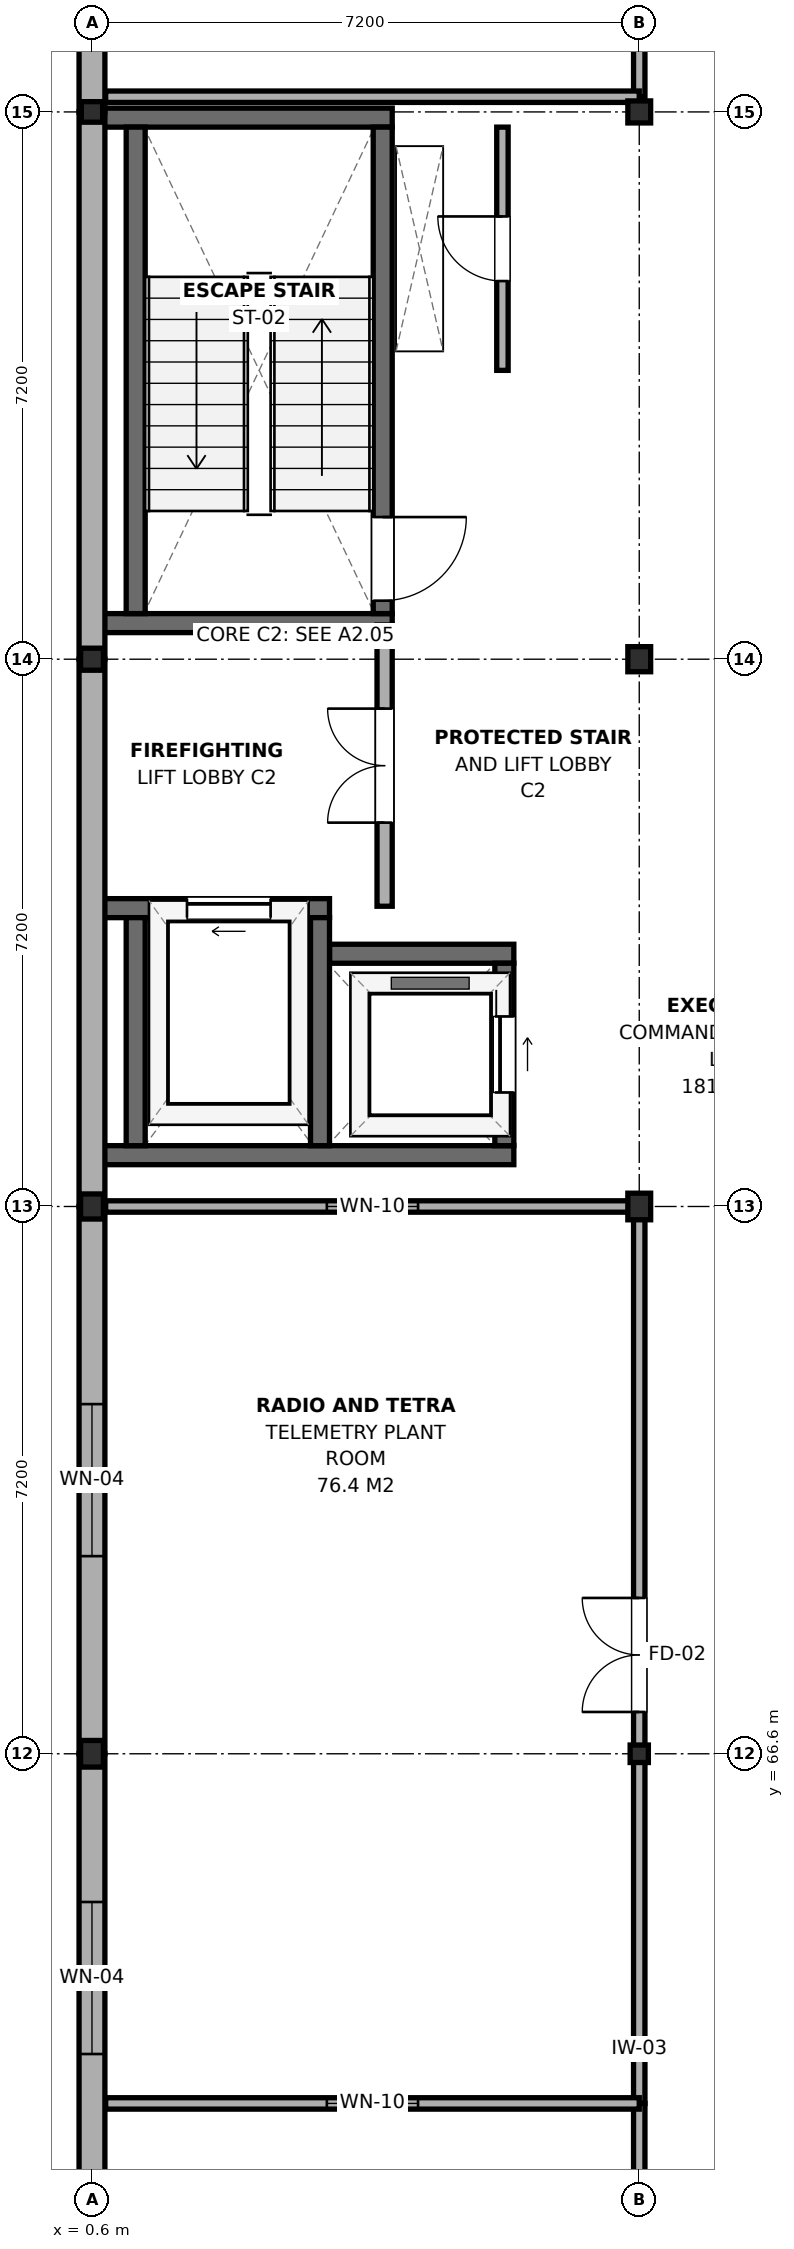
"""IFC4 building model, lengths in metres.
Left out: names, types, materials, properties, quantities, classifications, styles, units other than length and angle.
Written with IfcOpenShell. Run it as: python <this file> out.ifc"""

import sys

from ifc_helpers import new_model, si_unit, direction, frame, frame_2d, origin, origin_2d, place, context, subcontext, project, spatial, rectangle, i_section, extrude, element, fill, save


model = new_model("IFC4")
c1 = context("Model", 3, precision=1e-05, world=origin(), true_north=direction((0.0, 1.0)))
c2 = subcontext(c1, "Body", "Model", "MODEL_VIEW")
j1 = project(units=[si_unit("LENGTHUNIT", "METRE"), si_unit("PLANEANGLEUNIT", "RADIAN")], contexts=[c1])
p1 = place(None, origin())
s1 = spatial("IfcSite", under=j1, at=p1, CompositionType="ELEMENT")
p2 = place(p1, origin())
s2 = spatial("IfcBuilding", under=s1, at=p2, CompositionType="ELEMENT")
p3 = place(p2, frame((0.0, 0.0, 32.7)))
s3 = spatial("IfcBuildingStorey", under=s2, at=p3, CompositionType="ELEMENT", Elevation=32.7)
p4 = place(p3, frame((0.6, 66.6, 0.0), z_axis=(0.0, 0.0, 1.0), x_axis=(1.0, 0.0, 0.0)))
e1 = element("IfcColumn", 1, at=p4, inside=s3, PredefinedType="COLUMN", context=c2, shape_type="SweptSolid", body=[
    extrude(i_section(OverallWidth=0.3, OverallDepth=0.35, WebThickness=0.01, FlangeThickness=0.018, FilletRadius=0.027, at=origin_2d()), origin(), (0.0, 0.0, 1.0), 3.72),
])
p5 = place(p3, frame((0.6, 73.8, 0.0), z_axis=(0.0, 0.0, 1.0), x_axis=(1.0, 0.0, 0.0)))
e2 = element("IfcColumn", 2, at=p5, inside=s3, PredefinedType="COLUMN", context=c2, shape_type="SweptSolid", body=[
    extrude(i_section(OverallWidth=0.3, OverallDepth=0.33, WebThickness=0.01, FlangeThickness=0.017, FilletRadius=0.027, at=origin_2d()), origin(), (0.0, 0.0, 1.0), 3.72),
])
p6 = place(p3, frame((0.6, 81.0, 0.0), z_axis=(0.0, 0.0, 1.0), x_axis=(1.0, 0.0, 0.0)))
e3 = element("IfcColumn", 3, at=p6, inside=s3, PredefinedType="COLUMN", context=c2, shape_type="SweptSolid", body=[
    extrude(i_section(OverallWidth=0.3, OverallDepth=0.29, WebThickness=0.009, FlangeThickness=0.014, FilletRadius=0.027, at=origin_2d()), origin(), (0.0, 0.0, 1.0), 3.72),
])
p7 = place(p3, frame((0.6, 88.2, 0.0), z_axis=(0.0, 0.0, 1.0), x_axis=(1.0, 0.0, 0.0)))
e4 = element("IfcColumn", 4, at=p7, inside=s3, PredefinedType="COLUMN", context=c2, shape_type="SweptSolid", body=[
    extrude(i_section(OverallWidth=0.28, OverallDepth=0.27, WebThickness=0.008, FlangeThickness=0.013, FilletRadius=0.024, at=origin_2d()), origin(), (0.0, 0.0, 1.0), 3.72),
])
p8 = place(p3, frame((7.8, 66.6, 0.0), z_axis=(0.0, 0.0, 1.0), x_axis=(1.0, 0.0, 0.0)))
e5 = element("IfcColumn", 5, at=p8, inside=s3, PredefinedType="COLUMN", context=c2, shape_type="SweptSolid", body=[
    extrude(i_section(OverallWidth=0.24, OverallDepth=0.23, WebThickness=0.008, FlangeThickness=0.012, FilletRadius=0.021, at=origin_2d()), origin(), (0.0, 0.0, 1.0), 3.72),
])
p9 = place(p3, frame((7.8, 73.8, 0.0), z_axis=(0.0, 0.0, 1.0), x_axis=(1.0, 0.0, 0.0)))
e6 = element("IfcColumn", 6, at=p9, inside=s3, PredefinedType="COLUMN", context=c2, shape_type="SweptSolid", body=[
    extrude(i_section(OverallWidth=0.3, OverallDepth=0.35, WebThickness=0.01, FlangeThickness=0.018, FilletRadius=0.027, at=origin_2d()), origin(), (0.0, 0.0, 1.0), 3.72),
])
p10 = place(p3, frame((7.8, 81.0, 0.0), z_axis=(0.0, 0.0, 1.0), x_axis=(1.0, 0.0, 0.0)))
e7 = element("IfcColumn", 7, at=p10, inside=s3, PredefinedType="COLUMN", context=c2, shape_type="SweptSolid", body=[
    extrude(i_section(OverallWidth=0.3, OverallDepth=0.33, WebThickness=0.01, FlangeThickness=0.017, FilletRadius=0.027, at=origin_2d()), origin(), (0.0, 0.0, 1.0), 3.72),
])
p11 = place(p3, frame((7.8, 88.2, 0.0), z_axis=(0.0, 0.0, 1.0), x_axis=(1.0, 0.0, 0.0)))
e8 = element("IfcColumn", 8, at=p11, inside=s3, PredefinedType="COLUMN", context=c2, shape_type="SweptSolid", body=[
    extrude(i_section(OverallWidth=0.3, OverallDepth=0.29, WebThickness=0.009, FlangeThickness=0.014, FilletRadius=0.027, at=origin_2d()), origin(), (0.0, 0.0, 1.0), 3.72),
])
for number, where, z_axis, x_axis in (
    (9, (0.75, 81.475, 0.0), (0.0, 0.0, 1.0), (1.0, 0.0, 0.0)),
    (10, (0.75, 88.125, 0.0), (0.0, 0.0, 1.0), (1.0, 0.0, 0.0)),
):
    element("IfcWall", number, at=place(p3, frame(where, z_axis=z_axis, x_axis=x_axis)), inside=s3, PredefinedType="SHEAR", context=c2, shape_type="SweptSolid", body=[
        extrude(rectangle(XDim=3.8, YDim=0.25, at=frame_2d((1.9, 0.0))), origin(), (0.0, 0.0, 1.0), 3.9),
    ])
p12 = place(p3, frame((1.175, 81.6, 0.0), z_axis=(0.0, 0.0, 1.0), x_axis=(0.0, 1.0, 0.0)))
e11 = element("IfcWall", 11, at=p12, inside=s3, PredefinedType="SHEAR", context=c2, shape_type="SweptSolid", body=[
    extrude(rectangle(XDim=6.4, YDim=0.25, at=frame_2d((3.2, 0.0))), origin(), (0.0, 0.0, 1.0), 3.9),
])
p13 = place(p3, frame((4.425, 81.6, 0.0), z_axis=(0.0, 0.0, 1.0), x_axis=(0.0, 1.0, 0.0)))
e12 = element("IfcWall", 12, at=p13, inside=s3, PredefinedType="SHEAR", context=c2, shape_type="SweptSolid", body=[
    extrude(rectangle(XDim=6.4, YDim=0.25, at=frame_2d((3.2, 0.0))), origin(), (0.0, 0.0, 1.0), 3.9),
])
p14 = place(p13, frame((0.17, 0.0, 0.0)))
e13 = element("IfcOpeningElement", 13, at=p14, cuts=e12, PredefinedType="OPENING", context=c2, shape_type="SweptSolid", body=[
    extrude(rectangle(XDim=1.1, YDim=2.15, at=frame_2d((0.55, 1.075))), frame((0.0, 0.14, 0.0), z_axis=(0.0, -1.0, 0.0), x_axis=(1.0, 0.0, 0.0)), (0.0, 0.0, 1.0), 0.28),
])
p15 = place(p3, frame((0.75, 74.475, 0.0), z_axis=(0.0, 0.0, 1.0), x_axis=(1.0, 0.0, 0.0)))
e14 = element("IfcWall", 14, at=p15, inside=s3, PredefinedType="SHEAR", context=c2, shape_type="SweptSolid", body=[
    extrude(rectangle(XDim=5.4, YDim=0.25, at=frame_2d((2.7, 0.0))), origin(), (0.0, 0.0, 1.0), 3.9),
])
p16 = place(p3, frame((0.75, 77.725, 0.0), z_axis=(0.0, 0.0, 1.0), x_axis=(1.0, 0.0, 0.0)))
e15 = element("IfcWall", 15, at=p16, inside=s3, PredefinedType="SHEAR", context=c2, shape_type="SweptSolid", body=[
    extrude(rectangle(XDim=2.975, YDim=0.25, at=frame_2d((1.488, 0.0))), origin(), (0.0, 0.0, 1.0), 3.9),
])
p17 = place(p16, frame((1.1, 0.0, 0.0)))
e16 = element("IfcOpeningElement", 16, at=p17, cuts=e15, PredefinedType="OPENING", context=c2, shape_type="SweptSolid", body=[
    extrude(rectangle(XDim=1.1, YDim=2.15, at=frame_2d((0.55, 1.075))), frame((0.0, 0.14, 0.0), z_axis=(0.0, -1.0, 0.0), x_axis=(1.0, 0.0, 0.0)), (0.0, 0.0, 1.0), 0.28),
])
p18 = place(p3, frame((3.725, 77.125, 0.0), z_axis=(0.0, 0.0, 1.0), x_axis=(1.0, 0.0, 0.0)))
e17 = element("IfcWall", 17, at=p18, inside=s3, PredefinedType="SHEAR", context=c2, shape_type="SweptSolid", body=[
    extrude(rectangle(XDim=2.425, YDim=0.25, at=frame_2d((1.212, 0.0))), origin(), (0.0, 0.0, 1.0), 3.9),
])
for number, where, z_axis, x_axis in (
    (18, (1.175, 74.6, 0.0), (0.0, 0.0, 1.0), (0.0, 1.0, 0.0)),
    (19, (3.6, 74.6, 0.0), (0.0, 0.0, 1.0), (0.0, 1.0, 0.0)),
):
    element("IfcWall", number, at=place(p3, frame(where, z_axis=z_axis, x_axis=x_axis)), inside=s3, PredefinedType="SHEAR", context=c2, shape_type="SweptSolid", body=[
        extrude(rectangle(XDim=3.0, YDim=0.25, at=frame_2d((1.5, 0.0))), origin(), (0.0, 0.0, 1.0), 3.9),
    ])
p19 = place(p3, frame((6.025, 74.6, 0.0), z_axis=(0.0, 0.0, 1.0), x_axis=(0.0, 1.0, 0.0)))
e20 = element("IfcWall", 20, at=p19, inside=s3, PredefinedType="SHEAR", context=c2, shape_type="SweptSolid", body=[
    extrude(rectangle(XDim=2.4, YDim=0.25, at=frame_2d((1.2, 0.0))), origin(), (0.0, 0.0, 1.0), 3.9),
])
p20 = place(p19, frame((0.7, 0.0, 0.0)))
e21 = element("IfcOpeningElement", 21, at=p20, cuts=e20, PredefinedType="OPENING", context=c2, shape_type="SweptSolid", body=[
    extrude(rectangle(XDim=1.0, YDim=2.15, at=frame_2d((0.5, 1.075))), frame((0.0, 0.14, 0.0), z_axis=(0.0, -1.0, 0.0), x_axis=(1.0, 0.0, 0.0)), (0.0, 0.0, 1.0), 0.28),
])
p21 = place(p3, frame((0.6, 58.8, 0.0), z_axis=(0.0, 0.0, 1.0), x_axis=(0.0, 1.0, 0.0)))
e22 = element("IfcWall", 22, at=p21, inside=s3, PredefinedType="SOLIDWALL", context=c2, shape_type="SweptSolid", body=[
    extrude(rectangle(XDim=7.8, YDim=0.34, at=frame_2d((3.9, 0.0))), origin(), (0.0, 0.0, 1.0), 3.115),
])
p22 = place(p21, frame((3.85, 0.0, 0.9)))
e23 = element("IfcOpeningElement", 23, at=p22, cuts=e22, PredefinedType="OPENING", context=c2, shape_type="SweptSolid", body=[
    extrude(rectangle(XDim=2.0, YDim=1.8, at=frame_2d((1.0, 0.9))), frame((0.0, 0.185, 0.0), z_axis=(0.0, -1.0, 0.0), x_axis=(1.0, 0.0, 0.0)), (0.0, 0.0, 1.0), 0.37),
])
p23 = place(p3, frame((0.6, 66.6, 0.0), z_axis=(0.0, 0.0, 1.0), x_axis=(0.0, 1.0, 0.0)))
e24 = element("IfcWall", 24, at=p23, inside=s3, PredefinedType="SOLIDWALL", context=c2, shape_type="SweptSolid", body=[
    extrude(rectangle(XDim=7.2, YDim=0.34, at=frame_2d((3.6, 0.0))), origin(), (0.0, 0.0, 1.0), 3.115),
])
p24 = place(p23, frame((2.6, 0.0, 0.9)))
e25 = element("IfcOpeningElement", 25, at=p24, cuts=e24, PredefinedType="OPENING", context=c2, shape_type="SweptSolid", body=[
    extrude(rectangle(XDim=2.0, YDim=1.8, at=frame_2d((1.0, 0.9))), frame((0.0, 0.185, 0.0), z_axis=(0.0, -1.0, 0.0), x_axis=(1.0, 0.0, 0.0)), (0.0, 0.0, 1.0), 0.37),
])
p25 = place(p3, frame((0.6, 73.8, 0.0), z_axis=(0.0, 0.0, 1.0), x_axis=(0.0, 1.0, 0.0)))
e26 = element("IfcWall", 26, at=p25, inside=s3, PredefinedType="SOLIDWALL", context=c2, shape_type="SweptSolid", body=[
    extrude(rectangle(XDim=7.2, YDim=0.34, at=frame_2d((3.6, 0.0))), origin(), (0.0, 0.0, 1.0), 3.115),
])
p26 = place(p3, frame((0.6, 81.0, 0.0), z_axis=(0.0, 0.0, 1.0), x_axis=(0.0, 1.0, 0.0)))
e27 = element("IfcWall", 27, at=p26, inside=s3, PredefinedType="SOLIDWALL", context=c2, shape_type="SweptSolid", body=[
    extrude(rectangle(XDim=7.2, YDim=0.34, at=frame_2d((3.6, 0.0))), origin(), (0.0, 0.0, 1.0), 3.165),
])
p27 = place(p3, frame((0.6, 88.2, 0.0), z_axis=(0.0, 0.0, 1.0), x_axis=(0.0, 1.0, 0.0)))
e28 = element("IfcWall", 28, at=p27, inside=s3, PredefinedType="SOLIDWALL", context=c2, shape_type="SweptSolid", body=[
    extrude(rectangle(XDim=7.8, YDim=0.34, at=frame_2d((3.9, 0.0))), origin(), (0.0, 0.0, 1.0), 3.125),
])
p28 = place(p27, frame((1.95, 0.0, 0.9)))
e29 = element("IfcOpeningElement", 29, at=p28, cuts=e28, PredefinedType="OPENING", context=c2, shape_type="SweptSolid", body=[
    extrude(rectangle(XDim=2.0, YDim=1.8, at=frame_2d((1.0, 0.9))), frame((0.0, 0.185, 0.0), z_axis=(0.0, -1.0, 0.0), x_axis=(1.0, 0.0, 0.0)), (0.0, 0.0, 1.0), 0.37),
])
p29 = place(p3, frame((4.45, 77.75, 0.0), z_axis=(0.0, 0.0, 1.0), x_axis=(0.0, 1.0, 0.0)))
e30 = element("IfcWall", 30, at=p29, inside=s3, PredefinedType="PARTITIONING", context=c2, shape_type="SweptSolid", body=[
    extrude(rectangle(XDim=3.7, YDim=0.2, at=frame_2d((1.85, 0.0))), origin(), (0.0, 0.0, 1.0), 3.215),
])
p30 = place(p29, frame((1.1, 0.0, 0.0)))
e31 = element("IfcOpeningElement", 31, at=p30, cuts=e30, PredefinedType="OPENING", context=c2, shape_type="SweptSolid", body=[
    extrude(rectangle(XDim=1.5, YDim=2.15, at=frame_2d((0.75, 1.075))), frame((0.0, 0.115, 0.0), z_axis=(0.0, -1.0, 0.0), x_axis=(1.0, 0.0, 0.0)), (0.0, 0.0, 1.0), 0.23),
])
p31 = place(p3, frame((6.0, 84.8, 0.0), z_axis=(0.0, 0.0, 1.0), x_axis=(0.0, 1.0, 0.0)))
e32 = element("IfcWall", 32, at=p31, inside=s3, PredefinedType="PARTITIONING", context=c2, shape_type="SweptSolid", body=[
    extrude(rectangle(XDim=3.2, YDim=0.15, at=frame_2d((1.6, 0.0))), origin(), (0.0, 0.0, 1.0), 3.365),
])
p32 = place(p31, frame((1.175, 0.0, 0.0)))
e33 = element("IfcOpeningElement", 33, at=p32, cuts=e32, PredefinedType="OPENING", context=c2, shape_type="SweptSolid", body=[
    extrude(rectangle(XDim=0.85, YDim=2.1, at=frame_2d((0.425, 1.05))), frame((0.0, 0.09, 0.0), z_axis=(0.0, -1.0, 0.0), x_axis=(1.0, 0.0, 0.0)), (0.0, 0.0, 1.0), 0.18),
])
p33 = place(p3, frame((7.8, 40.0, 0.0), z_axis=(0.0, 0.0, 1.0), x_axis=(0.0, 1.0, 0.0)))
e34 = element("IfcWall", 34, at=p33, inside=s3, PredefinedType="PARTITIONING", context=c2, shape_type="SweptSolid", body=[
    extrude(rectangle(XDim=22.0, YDim=0.15, at=frame_2d((11.0, 0.0))), origin(), (0.0, 0.0, 1.0), 3.115),
])
p34 = place(p33, frame((10.2, 0.0, 0.0)))
e35 = element("IfcOpeningElement", 35, at=p34, cuts=e34, PredefinedType="OPENING", context=c2, shape_type="SweptSolid", body=[
    extrude(rectangle(XDim=1.6, YDim=2.15, at=frame_2d((0.8, 1.075))), frame((0.0, 0.09, 0.0), z_axis=(0.0, -1.0, 0.0), x_axis=(1.0, 0.0, 0.0)), (0.0, 0.0, 1.0), 0.18),
])
p35 = place(p33, frame((4.2, 0.0, 0.95)))
e36 = element("IfcOpeningElement", 36, at=p35, cuts=e34, PredefinedType="OPENING", context=c2, shape_type="SweptSolid", body=[
    extrude(rectangle(XDim=2.6, YDim=1.5, at=frame_2d((1.3, 0.75))), frame((0.0, 0.09, 0.0), z_axis=(0.0, -1.0, 0.0), x_axis=(1.0, 0.0, 0.0)), (0.0, 0.0, 1.0), 0.18),
])
p36 = place(p33, frame((15.2, 0.0, 0.95)))
e37 = element("IfcOpeningElement", 37, at=p36, cuts=e34, PredefinedType="OPENING", context=c2, shape_type="SweptSolid", body=[
    extrude(rectangle(XDim=2.6, YDim=1.5, at=frame_2d((1.3, 0.75))), frame((0.0, 0.09, 0.0), z_axis=(0.0, -1.0, 0.0), x_axis=(1.0, 0.0, 0.0)), (0.0, 0.0, 1.0), 0.18),
])
p37 = place(p3, frame((7.8, 62.0, 0.0), z_axis=(0.0, 0.0, 1.0), x_axis=(0.0, 1.0, 0.0)))
e38 = element("IfcWall", 38, at=p37, inside=s3, PredefinedType="PARTITIONING", context=c2, shape_type="SweptSolid", body=[
    extrude(rectangle(XDim=11.8, YDim=0.15, at=frame_2d((5.9, 0.0))), origin(), (0.0, 0.0, 1.0), 3.115),
])
p38 = place(p37, frame((5.15, 0.0, 0.0)))
e39 = element("IfcOpeningElement", 39, at=p38, cuts=e38, PredefinedType="OPENING", context=c2, shape_type="SweptSolid", body=[
    extrude(rectangle(XDim=1.5, YDim=2.15, at=frame_2d((0.75, 1.075))), frame((0.0, 0.09, 0.0), z_axis=(0.0, -1.0, 0.0), x_axis=(1.0, 0.0, 0.0)), (0.0, 0.0, 1.0), 0.18),
])
p39 = place(p3, frame((0.78, 62.0, 0.0), z_axis=(0.0, 0.0, 1.0), x_axis=(1.0, 0.0, 0.0)))
e40 = element("IfcWall", 40, at=p39, inside=s3, PredefinedType="PARTITIONING", context=c2, shape_type="SweptSolid", body=[
    extrude(rectangle(XDim=7.02, YDim=0.15, at=frame_2d((3.51, 0.0))), origin(), (0.0, 0.0, 1.0), 3.115),
])
p40 = place(p39, frame((2.91, 0.0, 0.95)))
e41 = element("IfcOpeningElement", 41, at=p40, cuts=e40, PredefinedType="OPENING", context=c2, shape_type="SweptSolid", body=[
    extrude(rectangle(XDim=1.2, YDim=1.5, at=frame_2d((0.6, 0.75))), frame((0.0, 0.09, 0.0), z_axis=(0.0, -1.0, 0.0), x_axis=(1.0, 0.0, 0.0)), (0.0, 0.0, 1.0), 0.18),
])
p41 = place(p3, frame((0.78, 73.8, 0.0), z_axis=(0.0, 0.0, 1.0), x_axis=(1.0, 0.0, 0.0)))
e42 = element("IfcWall", 42, at=p41, inside=s3, PredefinedType="PARTITIONING", context=c2, shape_type="SweptSolid", body=[
    extrude(rectangle(XDim=7.02, YDim=0.15, at=frame_2d((3.51, 0.0))), origin(), (0.0, 0.0, 1.0), 3.115),
])
p42 = place(p41, frame((2.91, 0.0, 0.95)))
e43 = element("IfcOpeningElement", 43, at=p42, cuts=e42, PredefinedType="OPENING", context=c2, shape_type="SweptSolid", body=[
    extrude(rectangle(XDim=1.2, YDim=1.5, at=frame_2d((0.6, 0.75))), frame((0.0, 0.09, 0.0), z_axis=(0.0, -1.0, 0.0), x_axis=(1.0, 0.0, 0.0)), (0.0, 0.0, 1.0), 0.18),
])
p43 = place(p3, frame((7.8, 88.4, 0.0), z_axis=(0.0, 0.0, 1.0), x_axis=(0.0, 1.0, 0.0)))
e44 = element("IfcWall", 44, at=p43, inside=s3, PredefinedType="PARTITIONING", context=c2, shape_type="SweptSolid", body=[
    extrude(rectangle(XDim=4.242, YDim=0.15, at=frame_2d((2.121, 0.0))), origin(), (0.0, 0.0, 1.0), 3.365),
])
p44 = place(p43, frame((1.646, 0.0, 0.0)))
e45 = element("IfcOpeningElement", 45, at=p44, cuts=e44, PredefinedType="OPENING", context=c2, shape_type="SweptSolid", body=[
    extrude(rectangle(XDim=0.95, YDim=2.15, at=frame_2d((0.475, 1.075))), frame((0.0, 0.09, 0.0), z_axis=(0.0, -1.0, 0.0), x_axis=(1.0, 0.0, 0.0)), (0.0, 0.0, 1.0), 0.18),
])
p45 = place(p3, frame((0.78, 88.4, 0.0), z_axis=(0.0, 0.0, 1.0), x_axis=(1.0, 0.0, 0.0)))
e46 = element("IfcWall", 46, at=p45, inside=s3, PredefinedType="PARTITIONING", context=c2, shape_type="SweptSolid", body=[
    extrude(rectangle(XDim=7.02, YDim=0.15, at=frame_2d((3.51, 0.0))), origin(), (0.0, 0.0, 1.0), 3.265),
])
p46 = place(p22, origin())
e47 = element("IfcWindow", 47, at=p46, inside=s3, PartitioningType="SINGLE_PANEL", PredefinedType="WINDOW", context=c2, shape_type="SweptSolid", body=[
    extrude(rectangle(XDim=2.0, YDim=1.8, at=frame_2d((1.0, 0.9))), frame((0.0, 0.03, 0.0), z_axis=(0.0, -1.0, 0.0), x_axis=(1.0, 0.0, 0.0)), (0.0, 0.0, 1.0), 0.06),
])
fill(e23, e47)
p47 = place(p24, origin())
e48 = element("IfcWindow", 48, at=p47, inside=s3, PartitioningType="SINGLE_PANEL", PredefinedType="WINDOW", context=c2, shape_type="SweptSolid", body=[
    extrude(rectangle(XDim=2.0, YDim=1.8, at=frame_2d((1.0, 0.9))), frame((0.0, 0.03, 0.0), z_axis=(0.0, -1.0, 0.0), x_axis=(1.0, 0.0, 0.0)), (0.0, 0.0, 1.0), 0.06),
])
fill(e25, e48)
p48 = place(p14, frame((1.1, 0.0, 0.0), z_axis=(0.0, 0.0, 1.0), x_axis=(-1.0, 0.0, 0.0)))
e49 = element("IfcDoor", 49, at=p48, inside=s3, OperationType="SINGLE_SWING_LEFT", PredefinedType="DOOR", context=c2, shape_type="SweptSolid", body=[
    extrude(rectangle(XDim=1.1, YDim=2.15, at=frame_2d((0.55, 1.075))), frame((0.0, 0.025, 0.0), z_axis=(0.0, -1.0, 0.0), x_axis=(1.0, 0.0, 0.0)), (0.0, 0.0, 1.0), 0.05),
])
fill(e13, e49)
p49 = place(p17, origin())
e50 = element("IfcDoor", 50, at=p49, inside=s3, OperationType="SLIDING_TO_LEFT", PredefinedType="DOOR", context=c2, shape_type="SweptSolid", body=[
    extrude(rectangle(XDim=1.1, YDim=2.15, at=frame_2d((0.55, 1.075))), frame((0.0, 0.025, 0.0), z_axis=(0.0, -1.0, 0.0), x_axis=(1.0, 0.0, 0.0)), (0.0, 0.0, 1.0), 0.05),
])
fill(e16, e50)
p50 = place(p20, frame((1.0, 0.0, 0.0), z_axis=(0.0, 0.0, 1.0), x_axis=(-1.0, 0.0, 0.0)))
e51 = element("IfcDoor", 51, at=p50, inside=s3, OperationType="SLIDING_TO_RIGHT", PredefinedType="DOOR", context=c2, shape_type="SweptSolid", body=[
    extrude(rectangle(XDim=1.0, YDim=2.15, at=frame_2d((0.5, 1.075))), frame((0.0, 0.025, 0.0), z_axis=(0.0, -1.0, 0.0), x_axis=(1.0, 0.0, 0.0)), (0.0, 0.0, 1.0), 0.05),
])
fill(e21, e51)
p51 = place(p30, origin())
e52 = element("IfcDoor", 52, at=p51, inside=s3, OperationType="DOUBLE_DOOR_SINGLE_SWING", PredefinedType="DOOR", context=c2, shape_type="SweptSolid", body=[
    extrude(rectangle(XDim=1.5, YDim=2.15, at=frame_2d((0.75, 1.075))), frame((0.0, 0.025, 0.0), z_axis=(0.0, -1.0, 0.0), x_axis=(1.0, 0.0, 0.0)), (0.0, 0.0, 1.0), 0.05),
])
fill(e31, e52)
p52 = place(p32, origin())
e53 = element("IfcDoor", 53, at=p52, inside=s3, OperationType="SINGLE_SWING_RIGHT", PredefinedType="DOOR", context=c2, shape_type="SweptSolid", body=[
    extrude(rectangle(XDim=0.85, YDim=2.1, at=frame_2d((0.425, 1.05))), frame((0.0, 0.025, 0.0), z_axis=(0.0, -1.0, 0.0), x_axis=(1.0, 0.0, 0.0)), (0.0, 0.0, 1.0), 0.05),
])
fill(e33, e53)
p53 = place(p38, origin())
e54 = element("IfcDoor", 54, at=p53, inside=s3, OperationType="DOUBLE_DOOR_SINGLE_SWING", PredefinedType="DOOR", context=c2, shape_type="SweptSolid", body=[
    extrude(rectangle(XDim=1.5, YDim=2.15, at=frame_2d((0.75, 1.075))), frame((0.0, 0.025, 0.0), z_axis=(0.0, -1.0, 0.0), x_axis=(1.0, 0.0, 0.0)), (0.0, 0.0, 1.0), 0.05),
])
fill(e39, e54)
p54 = place(p40, origin())
e55 = element("IfcWindow", 55, at=p54, inside=s3, PartitioningType="SINGLE_PANEL", PredefinedType="WINDOW", context=c2, shape_type="SweptSolid", body=[
    extrude(rectangle(XDim=1.2, YDim=1.5, at=frame_2d((0.6, 0.75))), frame((0.0, 0.03, 0.0), z_axis=(0.0, -1.0, 0.0), x_axis=(1.0, 0.0, 0.0)), (0.0, 0.0, 1.0), 0.06),
])
fill(e41, e55)
p55 = place(p42, origin())
e56 = element("IfcWindow", 56, at=p55, inside=s3, PartitioningType="SINGLE_PANEL", PredefinedType="WINDOW", context=c2, shape_type="SweptSolid", body=[
    extrude(rectangle(XDim=1.2, YDim=1.5, at=frame_2d((0.6, 0.75))), frame((0.0, 0.03, 0.0), z_axis=(0.0, -1.0, 0.0), x_axis=(1.0, 0.0, 0.0)), (0.0, 0.0, 1.0), 0.06),
])
fill(e43, e56)
save(model, sys.argv[1])
